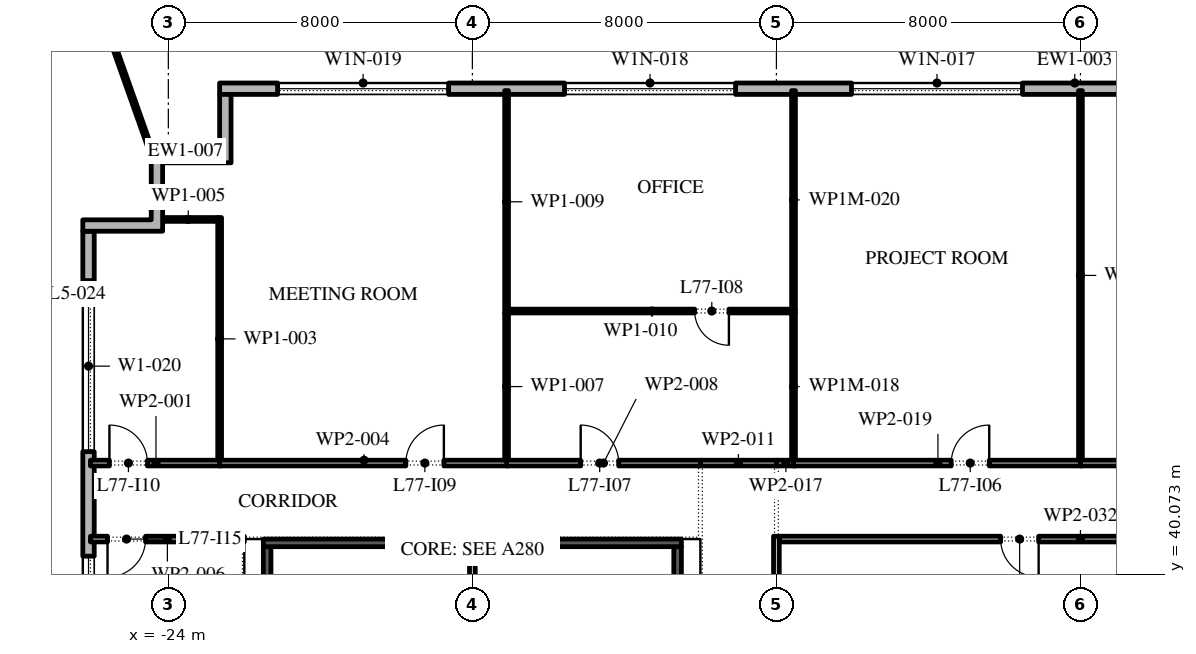
"""IFC4 building model, lengths in metres.
Left out: names, types, materials, properties, quantities, classifications, styles, units other than length and angle.
Written with IfcOpenShell. Run it as: python <this file> out.ifc"""

import sys

from ifc_helpers import new_model, si_unit, direction, frame, frame_2d, origin, place, context, subcontext, project, spatial, polyline, rectangle, outline, extrude, element, fill, save


model = new_model("IFC4")
c1 = context("Model", 3, precision=1e-05, world=origin(), true_north=direction((0.0, 1.0)))
c2 = subcontext(c1, "Body", "Model", "MODEL_VIEW")
j1 = project(units=[si_unit("LENGTHUNIT", "METRE"), si_unit("PLANEANGLEUNIT", "RADIAN")], contexts=[c1])
p1 = place(None, origin())
s1 = spatial("IfcSite", under=j1, at=p1, CompositionType="ELEMENT")
p2 = place(p1, origin())
s2 = spatial("IfcBuilding", under=s1, at=p2, CompositionType="ELEMENT")
p3 = place(p2, frame((0.0, 0.0, 351.0)))
s3 = spatial("IfcBuildingStorey", under=s2, at=p3, CompositionType="ELEMENT", Elevation=351.0)
p4 = place(p3, frame((22.35, 52.85, 0.0), z_axis=(0.0, 0.0, 1.0), x_axis=(-1.0, 0.0, 0.0)))
e1 = element("IfcWall", 1, at=p4, inside=s3, PredefinedType="STANDARD", context=c2, shape_type="SweptSolid", body=[
    extrude(rectangle(XDim=45.0, YDim=0.3, at=frame_2d((22.5, 0.0))), origin(), (0.0, 0.0, 1.0), 4.0),
])
p5 = place(p4, frame((1.375, 0.0, 0.45)))
e2 = element("IfcOpeningElement", 2, at=p5, cuts=e1, PredefinedType="OPENING", context=c2, shape_type="SweptSolid", body=[
    extrude(rectangle(XDim=4.5, YDim=2.525, at=frame_2d((2.25, 1.262))), frame((0.0, 0.16, 0.0), z_axis=(0.0, -1.0, 0.0), x_axis=(1.0, 0.0, 0.0)), (0.0, 0.0, 1.0), 0.32),
])
p6 = place(p4, frame((8.775, 0.0, 0.45)))
e3 = element("IfcOpeningElement", 3, at=p6, cuts=e1, PredefinedType="OPENING", context=c2, shape_type="SweptSolid", body=[
    extrude(rectangle(XDim=4.5, YDim=2.525, at=frame_2d((2.25, 1.262))), frame((0.0, 0.16, 0.0), z_axis=(0.0, -1.0, 0.0), x_axis=(1.0, 0.0, 0.0)), (0.0, 0.0, 1.0), 0.32),
])
p7 = place(p4, frame((17.375, 0.0, 0.0)))
e4 = element("IfcOpeningElement", 4, at=p7, cuts=e1, PredefinedType="OPENING", context=c2, shape_type="SweptSolid", body=[
    extrude(rectangle(XDim=2.4, YDim=2.975, at=frame_2d((1.2, 1.488))), frame((0.0, 0.16, 0.0), z_axis=(0.0, -1.0, 0.0), x_axis=(1.0, 0.0, 0.0)), (0.0, 0.0, 1.0), 0.32),
])
p8 = place(p4, frame((23.875, 0.0, 0.45)))
e5 = element("IfcOpeningElement", 5, at=p8, cuts=e1, PredefinedType="OPENING", context=c2, shape_type="SweptSolid", body=[
    extrude(rectangle(XDim=4.5, YDim=2.525, at=frame_2d((2.25, 1.262))), frame((0.0, 0.16, 0.0), z_axis=(0.0, -1.0, 0.0), x_axis=(1.0, 0.0, 0.0)), (0.0, 0.0, 1.0), 0.32),
])
p9 = place(p4, frame((31.425, 0.0, 0.45)))
e6 = element("IfcOpeningElement", 6, at=p9, cuts=e1, PredefinedType="OPENING", context=c2, shape_type="SweptSolid", body=[
    extrude(rectangle(XDim=4.5, YDim=2.525, at=frame_2d((2.25, 1.262))), frame((0.0, 0.16, 0.0), z_axis=(0.0, -1.0, 0.0), x_axis=(1.0, 0.0, 0.0)), (0.0, 0.0, 1.0), 0.32),
])
p10 = place(p4, frame((38.975, 0.0, 0.45)))
e7 = element("IfcOpeningElement", 7, at=p10, cuts=e1, PredefinedType="OPENING", context=c2, shape_type="SweptSolid", body=[
    extrude(rectangle(XDim=4.5, YDim=2.525, at=frame_2d((2.25, 1.262))), frame((0.0, 0.16, 0.0), z_axis=(0.0, -1.0, 0.0), x_axis=(1.0, 0.0, 0.0)), (0.0, 0.0, 1.0), 0.32),
])
p11 = place(p3, frame((-26.1, 49.1, 0.0), z_axis=(0.0, 0.0, 1.0), x_axis=(0.0, -1.0, 0.0)))
e8 = element("IfcWall", 8, at=p11, inside=s3, PredefinedType="STANDARD", context=c2, shape_type="SweptSolid", body=[
    extrude(rectangle(XDim=51.5, YDim=0.3, at=frame_2d((25.75, 0.0))), origin(), (0.0, 0.0, 1.0), 4.0),
])
p12 = place(p11, frame((1.3, 0.0, 0.45)))
e9 = element("IfcOpeningElement", 9, at=p12, cuts=e8, PredefinedType="OPENING", context=c2, shape_type="SweptSolid", body=[
    extrude(rectangle(XDim=4.5, YDim=3.05, at=frame_2d((2.25, 1.525))), frame((0.0, 0.16, 0.0), z_axis=(0.0, -1.0, 0.0), x_axis=(1.0, 0.0, 0.0)), (0.0, 0.0, 1.0), 0.32),
])
p13 = place(p11, frame((8.55, 0.0, 0.45)))
e10 = element("IfcOpeningElement", 10, at=p13, cuts=e8, PredefinedType="OPENING", context=c2, shape_type="SweptSolid", body=[
    extrude(rectangle(XDim=4.5, YDim=3.05, at=frame_2d((2.25, 1.525))), frame((0.0, 0.16, 0.0), z_axis=(0.0, -1.0, 0.0), x_axis=(1.0, 0.0, 0.0)), (0.0, 0.0, 1.0), 0.32),
])
p14 = place(p11, frame((17.0, 0.0, 0.0)))
e11 = element("IfcOpeningElement", 11, at=p14, cuts=e8, PredefinedType="OPENING", context=c2, shape_type="SweptSolid", body=[
    extrude(rectangle(XDim=2.4, YDim=3.5, at=frame_2d((1.2, 1.75))), frame((0.0, 0.16, 0.0), z_axis=(0.0, -1.0, 0.0), x_axis=(1.0, 0.0, 0.0)), (0.0, 0.0, 1.0), 0.32),
])
p15 = place(p11, frame((23.35, 0.0, 0.45)))
e12 = element("IfcOpeningElement", 12, at=p15, cuts=e8, PredefinedType="OPENING", context=c2, shape_type="SweptSolid", body=[
    extrude(rectangle(XDim=4.5, YDim=3.05, at=frame_2d((2.25, 1.525))), frame((0.0, 0.16, 0.0), z_axis=(0.0, -1.0, 0.0), x_axis=(1.0, 0.0, 0.0)), (0.0, 0.0, 1.0), 0.32),
])
p16 = place(p11, frame((30.75, 0.0, 0.45)))
e13 = element("IfcOpeningElement", 13, at=p16, cuts=e8, PredefinedType="OPENING", context=c2, shape_type="SweptSolid", body=[
    extrude(rectangle(XDim=4.5, YDim=3.05, at=frame_2d((2.25, 1.525))), frame((0.0, 0.16, 0.0), z_axis=(0.0, -1.0, 0.0), x_axis=(1.0, 0.0, 0.0)), (0.0, 0.0, 1.0), 0.32),
])
p17 = place(p11, frame((38.15, 0.0, 0.45)))
e14 = element("IfcOpeningElement", 14, at=p17, cuts=e8, PredefinedType="OPENING", context=c2, shape_type="SweptSolid", body=[
    extrude(rectangle(XDim=4.5, YDim=3.05, at=frame_2d((2.25, 1.525))), frame((0.0, 0.16, 0.0), z_axis=(0.0, -1.0, 0.0), x_axis=(1.0, 0.0, 0.0)), (0.0, 0.0, 1.0), 0.32),
])
p18 = place(p11, frame((46.6, 0.0, 0.0)))
e15 = element("IfcOpeningElement", 15, at=p18, cuts=e8, PredefinedType="OPENING", context=c2, shape_type="SweptSolid", body=[
    extrude(rectangle(XDim=2.4, YDim=3.5, at=frame_2d((1.2, 1.75))), frame((0.0, 0.16, 0.0), z_axis=(0.0, -1.0, 0.0), x_axis=(1.0, 0.0, 0.0)), (0.0, 0.0, 1.0), 0.32),
])
p19 = place(p3, origin())
e16 = element("IfcWall", 16, at=p19, inside=s3, PredefinedType="STANDARD", context=c2, shape_type="SweptSolid", body=[
    extrude(outline(polyline([(-24.45, 49.4), (-24.45, 51.2), (-22.65, 51.2), (-22.65, 52.7), (-22.35, 52.7), (-22.35, 50.9), (-24.15, 50.9), (-24.15, 49.1), (-26.25, 49.1), (-26.25, 49.4), (-24.45, 49.4)])), origin(), (0.0, 0.0, 1.0), 4.0),
])
p20 = place(p3, frame((-24.45, 51.2, -0.05), z_axis=(0.0, 0.0, 1.0), x_axis=(-0.334395746366, 0.942432748164, 0.0)))
e17 = element("IfcWall", 17, at=p20, inside=s3, PredefinedType="STANDARD", context=c2, shape_type="SweptSolid", body=[
    extrude(rectangle(XDim=6.45, YDim=0.1, at=frame_2d((3.225, 0.0))), origin(), (0.0, 0.0, 1.0), 4.05),
])
p21 = place(p3, frame((-21.4, 25.75, 0.0), z_axis=(0.0, 0.0, 1.0), x_axis=(0.0, 1.0, 0.0)))
e18 = element("IfcWall", 18, at=p21, inside=s3, PredefinedType="SHEAR", context=c2, shape_type="SweptSolid", body=[
    extrude(rectangle(XDim=15.05, YDim=0.2, at=frame_2d((7.525, 0.0))), origin(), (0.0, 0.0, 1.0), 4.0),
])
p22 = place(p21, frame((7.075, 0.0, 0.0)))
e19 = element("IfcOpeningElement", 19, at=p22, cuts=e18, PredefinedType="OPENING", context=c2, shape_type="SweptSolid", body=[
    extrude(rectangle(XDim=0.9, YDim=2.1, at=frame_2d((0.45, 1.05))), frame((0.0, 0.11, 0.0), z_axis=(0.0, -1.0, 0.0), x_axis=(1.0, 0.0, 0.0)), (0.0, 0.0, 1.0), 0.22),
])
p23 = place(p3, frame((-10.6, 25.75, 0.0), z_axis=(0.0, 0.0, 1.0), x_axis=(0.0, 1.0, 0.0)))
e20 = element("IfcWall", 20, at=p23, inside=s3, PredefinedType="SHEAR", context=c2, shape_type="SweptSolid", body=[
    extrude(rectangle(XDim=15.05, YDim=0.2, at=frame_2d((7.525, 0.0))), origin(), (0.0, 0.0, 1.0), 4.0),
])
p24 = place(p23, frame((7.075, 0.0, 0.0)))
e21 = element("IfcOpeningElement", 21, at=p24, cuts=e20, PredefinedType="OPENING", context=c2, shape_type="SweptSolid", body=[
    extrude(rectangle(XDim=0.9, YDim=2.1, at=frame_2d((0.45, 1.05))), frame((0.0, 0.11, 0.0), z_axis=(0.0, -1.0, 0.0), x_axis=(1.0, 0.0, 0.0)), (0.0, 0.0, 1.0), 0.22),
])
p25 = place(p3, frame((-21.5, 40.9, 0.0), z_axis=(0.0, 0.0, 1.0), x_axis=(1.0, 0.0, 0.0)))
e22 = element("IfcWall", 22, at=p25, inside=s3, PredefinedType="SHEAR", context=c2, shape_type="SweptSolid", body=[
    extrude(rectangle(XDim=11.0, YDim=0.2, at=frame_2d((5.5, 0.0))), origin(), (0.0, 0.0, 1.0), 4.0),
])
p26 = place(p3, frame((-16.0, 25.75, 0.0), z_axis=(0.0, 0.0, 1.0), x_axis=(0.0, 1.0, 0.0)))
e23 = element("IfcWall", 23, at=p26, inside=s3, PredefinedType="PARTITIONING", context=c2, shape_type="SweptSolid", body=[
    extrude(rectangle(XDim=15.05, YDim=0.15, at=frame_2d((7.525, 0.0))), origin(), (0.0, 0.0, 1.0), 4.0),
])
p27 = place(p3, frame((-26.05, 43.0, 0.0), z_axis=(0.0, 0.0, 1.0), x_axis=(1.0, 0.0, 0.0)))
e24 = element("IfcWall", 24, at=p27, inside=s3, PredefinedType="PARTITIONING", context=c2, shape_type="SweptSolid", body=[
    extrude(rectangle(XDim=3.45, YDim=0.15, at=frame_2d((1.725, 0.0))), origin(), (0.0, 0.0, 1.0), 4.0),
])
p28 = place(p27, frame((0.5, 0.0, 0.0)))
e25 = element("IfcOpeningElement", 25, at=p28, cuts=e24, PredefinedType="OPENING", context=c2, shape_type="SweptSolid", body=[
    extrude(rectangle(XDim=1.0, YDim=2.1, at=frame_2d((0.5, 1.05))), frame((0.0, 0.085, 0.0), z_axis=(0.0, -1.0, 0.0), x_axis=(1.0, 0.0, 0.0)), (0.0, 0.0, 1.0), 0.17),
])
p29 = place(p3, frame((-22.65, 43.075, 0.0), z_axis=(0.0, 0.0, 1.0), x_axis=(0.0, 1.0, 0.0)))
e26 = element("IfcWall", 26, at=p29, inside=s3, PredefinedType="PARTITIONING", context=c2, shape_type="SweptSolid", body=[
    extrude(rectangle(XDim=6.385, YDim=0.1, at=frame_2d((3.192, 0.0))), origin(), (0.0, 0.0, 1.0), 4.0),
])
p30 = place(p3, frame((-22.65, 43.0, 0.0), z_axis=(0.0, 0.0, 1.0), x_axis=(1.0, 0.0, 0.0)))
e27 = element("IfcWall", 27, at=p30, inside=s3, PredefinedType="PARTITIONING", context=c2, shape_type="SweptSolid", body=[
    extrude(rectangle(XDim=7.6, YDim=0.15, at=frame_2d((3.8, 0.0))), origin(), (0.0, 0.0, 1.0), 4.0),
])
p31 = place(p30, frame((4.9, 0.0, 0.0)))
e28 = element("IfcOpeningElement", 28, at=p31, cuts=e27, PredefinedType="OPENING", context=c2, shape_type="SweptSolid", body=[
    extrude(rectangle(XDim=1.0, YDim=2.1, at=frame_2d((0.5, 1.05))), frame((0.0, 0.085, 0.0), z_axis=(0.0, -1.0, 0.0), x_axis=(1.0, 0.0, 0.0)), (0.0, 0.0, 1.0), 0.17),
])
p32 = place(p3, frame((-22.7, 49.41, 0.0), z_axis=(0.0, 0.0, 1.0), x_axis=(-1.0, 0.0, 0.0)))
e29 = element("IfcWall", 29, at=p32, inside=s3, PredefinedType="PARTITIONING", context=c2, shape_type="SweptSolid", body=[
    extrude(rectangle(XDim=1.55, YDim=0.1, at=frame_2d((0.775, 0.0))), origin(), (0.0, 0.0, 1.0), 4.0),
])
p33 = place(p3, frame((-22.0, 41.0, 0.0), z_axis=(0.0, 0.0, 1.0), x_axis=(-1.0, 0.0, 0.0)))
e30 = element("IfcWall", 30, at=p33, inside=s3, PredefinedType="PARTITIONING", context=c2, shape_type="SweptSolid", body=[
    extrude(rectangle(XDim=4.05, YDim=0.15, at=frame_2d((2.025, 0.0))), origin(), (0.0, 0.0, 1.0), 4.0),
])
p34 = place(p33, frame((2.6, 0.0, 0.0)))
e31 = element("IfcOpeningElement", 31, at=p34, cuts=e30, PredefinedType="OPENING", context=c2, shape_type="SweptSolid", body=[
    extrude(rectangle(XDim=1.0, YDim=2.1, at=frame_2d((0.5, 1.05))), frame((0.0, 0.085, 0.0), z_axis=(0.0, -1.0, 0.0), x_axis=(1.0, 0.0, 0.0)), (0.0, 0.0, 1.0), 0.17),
])
p35 = place(p3, frame((-15.1, 43.075, 0.0), z_axis=(0.0, 0.0, 1.0), x_axis=(0.0, 1.0, 0.0)))
e32 = element("IfcWall", 32, at=p35, inside=s3, PredefinedType="PARTITIONING", context=c2, shape_type="SweptSolid", body=[
    extrude(rectangle(XDim=3.875, YDim=0.1, at=frame_2d((1.938, 0.0))), origin(), (0.0, 0.0, 1.0), 4.0),
])
p36 = place(p3, frame((-15.1, 43.0, 0.0), z_axis=(0.0, 0.0, 1.0), x_axis=(1.0, 0.0, 0.0)))
e33 = element("IfcWall", 33, at=p36, inside=s3, PredefinedType="PARTITIONING", context=c2, shape_type="SweptSolid", body=[
    extrude(rectangle(XDim=5.1, YDim=0.15, at=frame_2d((2.55, 0.0))), origin(), (0.0, 0.0, 1.0), 4.0),
])
p37 = place(p36, frame((1.95, 0.0, 0.0)))
e34 = element("IfcOpeningElement", 34, at=p37, cuts=e33, PredefinedType="OPENING", context=c2, shape_type="SweptSolid", body=[
    extrude(rectangle(XDim=1.0, YDim=2.1, at=frame_2d((0.5, 1.05))), frame((0.0, 0.085, 0.0), z_axis=(0.0, -1.0, 0.0), x_axis=(1.0, 0.0, 0.0)), (0.0, 0.0, 1.0), 0.17),
])
p38 = place(p3, frame((-15.1, 46.95, 0.0), z_axis=(0.0, 0.0, 1.0), x_axis=(0.0, 1.0, 0.0)))
e35 = element("IfcWall", 35, at=p38, inside=s3, PredefinedType="PARTITIONING", context=c2, shape_type="SweptSolid", body=[
    extrude(rectangle(XDim=5.85, YDim=0.1, at=frame_2d((2.925, 0.0))), origin(), (0.0, 0.0, 1.0), 4.0),
])
p39 = place(p3, frame((-15.05, 47.0, 0.0), z_axis=(0.0, 0.0, 1.0), x_axis=(1.0, 0.0, 0.0)))
e36 = element("IfcWall", 36, at=p39, inside=s3, PredefinedType="PARTITIONING", context=c2, shape_type="SweptSolid", body=[
    extrude(rectangle(XDim=7.55, YDim=0.1, at=frame_2d((3.775, 0.0))), origin(), (0.0, 0.0, 1.0), 4.0),
])
p40 = place(p39, frame((4.9, 0.0, 0.0)))
e37 = element("IfcOpeningElement", 37, at=p40, cuts=e36, PredefinedType="OPENING", context=c2, shape_type="SweptSolid", body=[
    extrude(rectangle(XDim=0.9, YDim=2.1, at=frame_2d((0.45, 1.05))), frame((0.0, 0.06, 0.0), z_axis=(0.0, -1.0, 0.0), x_axis=(1.0, 0.0, 0.0)), (0.0, 0.0, 1.0), 0.12),
])
p41 = place(p3, frame((-10.0, 43.0, 0.0), z_axis=(0.0, 0.0, 1.0), x_axis=(1.0, 0.0, 0.0)))
e38 = element("IfcWall", 38, at=p41, inside=s3, PredefinedType="PARTITIONING", context=c2, shape_type="SweptSolid", body=[
    extrude(rectangle(XDim=2.0, YDim=0.15, at=frame_2d((1.0, 0.0))), origin(), (0.0, 0.0, 1.0), 4.0),
])
p42 = place(p3, frame((-8.0, 41.075, 0.0), z_axis=(0.0, 0.0, 1.0), x_axis=(0.0, -1.0, 0.0)))
e39 = element("IfcWall", 39, at=p42, inside=s3, PredefinedType="PARTITIONING", context=c2, shape_type="SweptSolid", body=[
    extrude(rectangle(XDim=6.475, YDim=0.15, at=frame_2d((3.237, 0.0))), origin(), (0.0, 0.0, 1.0), 4.0),
])
p43 = place(p3, frame((-8.0, 43.0, 0.0), z_axis=(0.0, 0.0, 1.0), x_axis=(1.0, 0.0, 0.0)))
e40 = element("IfcWall", 40, at=p43, inside=s3, PredefinedType="PARTITIONING", context=c2, shape_type="SweptSolid", body=[
    extrude(rectangle(XDim=0.5, YDim=0.15, at=frame_2d((0.25, 0.0))), origin(), (0.0, 0.0, 1.0), 4.0),
])
p44 = place(p3, frame((-7.55, 43.075, 0.0), z_axis=(0.0, 0.0, 1.0), x_axis=(0.0, 1.0, 0.0)))
e41 = element("IfcWall", 41, at=p44, inside=s3, PredefinedType="PARTITIONING", context=c2, shape_type="SweptSolid", body=[
    extrude(rectangle(XDim=3.875, YDim=0.1, at=frame_2d((1.938, 0.0))), origin(), (0.0, 0.0, 1.0), 3.096),
])
p45 = place(p3, frame((-7.55, 43.0, 0.0), z_axis=(0.0, 0.0, 1.0), x_axis=(1.0, 0.0, 0.0)))
e42 = element("IfcWall", 42, at=p45, inside=s3, PredefinedType="PARTITIONING", context=c2, shape_type="SweptSolid", body=[
    extrude(rectangle(XDim=7.6, YDim=0.15, at=frame_2d((3.8, 0.0))), origin(), (0.0, 0.0, 1.0), 4.0),
])
p46 = place(p45, frame((4.15, 0.0, 0.0)))
e43 = element("IfcOpeningElement", 43, at=p46, cuts=e42, PredefinedType="OPENING", context=c2, shape_type="SweptSolid", body=[
    extrude(rectangle(XDim=1.0, YDim=2.1, at=frame_2d((0.5, 1.05))), frame((0.0, 0.085, 0.0), z_axis=(0.0, -1.0, 0.0), x_axis=(1.0, 0.0, 0.0)), (0.0, 0.0, 1.0), 0.17),
])
p47 = place(p3, frame((-7.55, 47.05, 0.0), z_axis=(0.0, 0.0, 1.0), x_axis=(0.0, 1.0, 0.0)))
e44 = element("IfcWall", 44, at=p47, inside=s3, PredefinedType="PARTITIONING", context=c2, shape_type="SweptSolid", body=[
    extrude(rectangle(XDim=5.75, YDim=0.1, at=frame_2d((2.875, 0.0))), origin(), (0.0, 0.0, 1.0), 3.096),
])
p48 = place(p3, frame((0.0, 43.075, 0.0), z_axis=(0.0, 0.0, 1.0), x_axis=(0.0, 1.0, 0.0)))
e45 = element("IfcWall", 45, at=p48, inside=s3, PredefinedType="PARTITIONING", context=c2, shape_type="SweptSolid", body=[
    extrude(rectangle(XDim=9.725, YDim=0.1, at=frame_2d((4.863, 0.0))), origin(), (0.0, 0.0, 1.0), 4.0),
])
p49 = place(p3, frame((0.0, 43.0, 0.0), z_axis=(0.0, 0.0, 1.0), x_axis=(1.0, 0.0, 0.0)))
e46 = element("IfcWall", 46, at=p49, inside=s3, PredefinedType="PARTITIONING", context=c2, shape_type="SweptSolid", body=[
    extrude(rectangle(XDim=7.6, YDim=0.15, at=frame_2d((3.8, 0.0))), origin(), (0.0, 0.0, 1.0), 4.0),
])
p50 = place(p49, frame((4.9, 0.0, 0.0)))
e47 = element("IfcOpeningElement", 47, at=p50, cuts=e46, PredefinedType="OPENING", context=c2, shape_type="SweptSolid", body=[
    extrude(rectangle(XDim=1.0, YDim=2.1, at=frame_2d((0.5, 1.05))), frame((0.0, 0.085, 0.0), z_axis=(0.0, -1.0, 0.0), x_axis=(1.0, 0.0, 0.0)), (0.0, 0.0, 1.0), 0.17),
])
p51 = place(p3, frame((7.925, 41.0, 0.0), z_axis=(0.0, 0.0, 1.0), x_axis=(-1.0, 0.0, 0.0)))
e48 = element("IfcWall", 48, at=p51, inside=s3, PredefinedType="PARTITIONING", context=c2, shape_type="SweptSolid", body=[
    extrude(rectangle(XDim=15.85, YDim=0.15, at=frame_2d((7.925, 0.0))), origin(), (0.0, 0.0, 1.0), 4.0),
])
p52 = place(p51, frame((9.025, 0.0, 0.0)))
e49 = element("IfcOpeningElement", 49, at=p52, cuts=e48, PredefinedType="OPENING", context=c2, shape_type="SweptSolid", body=[
    extrude(rectangle(XDim=1.0, YDim=2.1, at=frame_2d((0.5, 1.05))), frame((0.0, 0.085, 0.0), z_axis=(0.0, -1.0, 0.0), x_axis=(1.0, 0.0, 0.0)), (0.0, 0.0, 1.0), 0.17),
])
p53 = place(p8, origin())
e50 = element("IfcWindow", 50, at=p53, inside=s3, PartitioningType="DOUBLE_PANEL_VERTICAL", PredefinedType="WINDOW", context=c2, shape_type="SweptSolid", body=[
    extrude(rectangle(XDim=4.5, YDim=2.525, at=frame_2d((2.25, 1.262))), frame((0.0, 0.03, 0.0), z_axis=(0.0, -1.0, 0.0), x_axis=(1.0, 0.0, 0.0)), (0.0, 0.0, 1.0), 0.06),
])
fill(e5, e50)
p54 = place(p9, origin())
e51 = element("IfcWindow", 51, at=p54, inside=s3, PartitioningType="DOUBLE_PANEL_VERTICAL", PredefinedType="WINDOW", context=c2, shape_type="SweptSolid", body=[
    extrude(rectangle(XDim=4.5, YDim=2.525, at=frame_2d((2.25, 1.262))), frame((0.0, 0.03, 0.0), z_axis=(0.0, -1.0, 0.0), x_axis=(1.0, 0.0, 0.0)), (0.0, 0.0, 1.0), 0.06),
])
fill(e6, e51)
p55 = place(p10, origin())
e52 = element("IfcWindow", 52, at=p55, inside=s3, PartitioningType="DOUBLE_PANEL_VERTICAL", PredefinedType="WINDOW", context=c2, shape_type="SweptSolid", body=[
    extrude(rectangle(XDim=4.5, YDim=2.525, at=frame_2d((2.25, 1.262))), frame((0.0, 0.03, 0.0), z_axis=(0.0, -1.0, 0.0), x_axis=(1.0, 0.0, 0.0)), (0.0, 0.0, 1.0), 0.06),
])
fill(e7, e52)
p56 = place(p12, origin())
e53 = element("IfcWindow", 53, at=p56, inside=s3, PartitioningType="DOUBLE_PANEL_VERTICAL", PredefinedType="WINDOW", context=c2, shape_type="SweptSolid", body=[
    extrude(rectangle(XDim=4.5, YDim=3.05, at=frame_2d((2.25, 1.525))), frame((0.0, 0.03, 0.0), z_axis=(0.0, -1.0, 0.0), x_axis=(1.0, 0.0, 0.0)), (0.0, 0.0, 1.0), 0.06),
])
fill(e9, e53)
p57 = place(p13, origin())
e54 = element("IfcWindow", 54, at=p57, inside=s3, PartitioningType="DOUBLE_PANEL_VERTICAL", PredefinedType="WINDOW", context=c2, shape_type="SweptSolid", body=[
    extrude(rectangle(XDim=4.5, YDim=3.05, at=frame_2d((2.25, 1.525))), frame((0.0, 0.03, 0.0), z_axis=(0.0, -1.0, 0.0), x_axis=(1.0, 0.0, 0.0)), (0.0, 0.0, 1.0), 0.06),
])
fill(e10, e54)
p58 = place(p46, origin())
e55 = element("IfcDoor", 55, at=p58, inside=s3, OperationType="SINGLE_SWING_LEFT", PredefinedType="DOOR", context=c2, shape_type="SweptSolid", body=[
    extrude(rectangle(XDim=1.0, YDim=2.1, at=frame_2d((0.5, 1.05))), frame((0.0, 0.025, 0.0), z_axis=(0.0, -1.0, 0.0), x_axis=(1.0, 0.0, 0.0)), (0.0, 0.0, 1.0), 0.05),
])
fill(e43, e55)
p59 = place(p37, origin())
e56 = element("IfcDoor", 56, at=p59, inside=s3, OperationType="SINGLE_SWING_RIGHT", PredefinedType="DOOR", context=c2, shape_type="SweptSolid", body=[
    extrude(rectangle(XDim=1.0, YDim=2.1, at=frame_2d((0.5, 1.05))), frame((0.0, 0.025, 0.0), z_axis=(0.0, -1.0, 0.0), x_axis=(1.0, 0.0, 0.0)), (0.0, 0.0, 1.0), 0.05),
])
fill(e34, e56)
p60 = place(p40, frame((0.9, 0.0, 0.0), z_axis=(0.0, 0.0, 1.0), x_axis=(-1.0, 0.0, 0.0)))
e57 = element("IfcDoor", 57, at=p60, inside=s3, OperationType="SINGLE_SWING_RIGHT", PredefinedType="DOOR", context=c2, shape_type="SweptSolid", body=[
    extrude(rectangle(XDim=0.9, YDim=2.1, at=frame_2d((0.45, 1.05))), frame((0.0, 0.025, 0.0), z_axis=(0.0, -1.0, 0.0), x_axis=(1.0, 0.0, 0.0)), (0.0, 0.0, 1.0), 0.05),
])
fill(e37, e57)
p61 = place(p31, origin())
e58 = element("IfcDoor", 58, at=p61, inside=s3, OperationType="SINGLE_SWING_LEFT", PredefinedType="DOOR", context=c2, shape_type="SweptSolid", body=[
    extrude(rectangle(XDim=1.0, YDim=2.1, at=frame_2d((0.5, 1.05))), frame((0.0, 0.025, 0.0), z_axis=(0.0, -1.0, 0.0), x_axis=(1.0, 0.0, 0.0)), (0.0, 0.0, 1.0), 0.05),
])
fill(e28, e58)
p62 = place(p28, origin())
e59 = element("IfcDoor", 59, at=p62, inside=s3, OperationType="SINGLE_SWING_RIGHT", PredefinedType="DOOR", context=c2, shape_type="SweptSolid", body=[
    extrude(rectangle(XDim=1.0, YDim=2.1, at=frame_2d((0.5, 1.05))), frame((0.0, 0.025, 0.0), z_axis=(0.0, -1.0, 0.0), x_axis=(1.0, 0.0, 0.0)), (0.0, 0.0, 1.0), 0.05),
])
fill(e25, e59)
p63 = place(p52, origin())
e60 = element("IfcDoor", 60, at=p63, inside=s3, OperationType="SINGLE_SWING_RIGHT", PredefinedType="DOOR", context=c2, shape_type="SweptSolid", body=[
    extrude(rectangle(XDim=1.0, YDim=2.1, at=frame_2d((0.5, 1.05))), frame((0.0, 0.025, 0.0), z_axis=(0.0, -1.0, 0.0), x_axis=(1.0, 0.0, 0.0)), (0.0, 0.0, 1.0), 0.05),
])
fill(e49, e60)
p64 = place(p34, origin())
e61 = element("IfcDoor", 61, at=p64, inside=s3, OperationType="SINGLE_SWING_LEFT", PredefinedType="DOOR", context=c2, shape_type="SweptSolid", body=[
    extrude(rectangle(XDim=1.0, YDim=2.1, at=frame_2d((0.5, 1.05))), frame((0.0, 0.025, 0.0), z_axis=(0.0, -1.0, 0.0), x_axis=(1.0, 0.0, 0.0)), (0.0, 0.0, 1.0), 0.05),
])
fill(e31, e61)
save(model, sys.argv[1])
